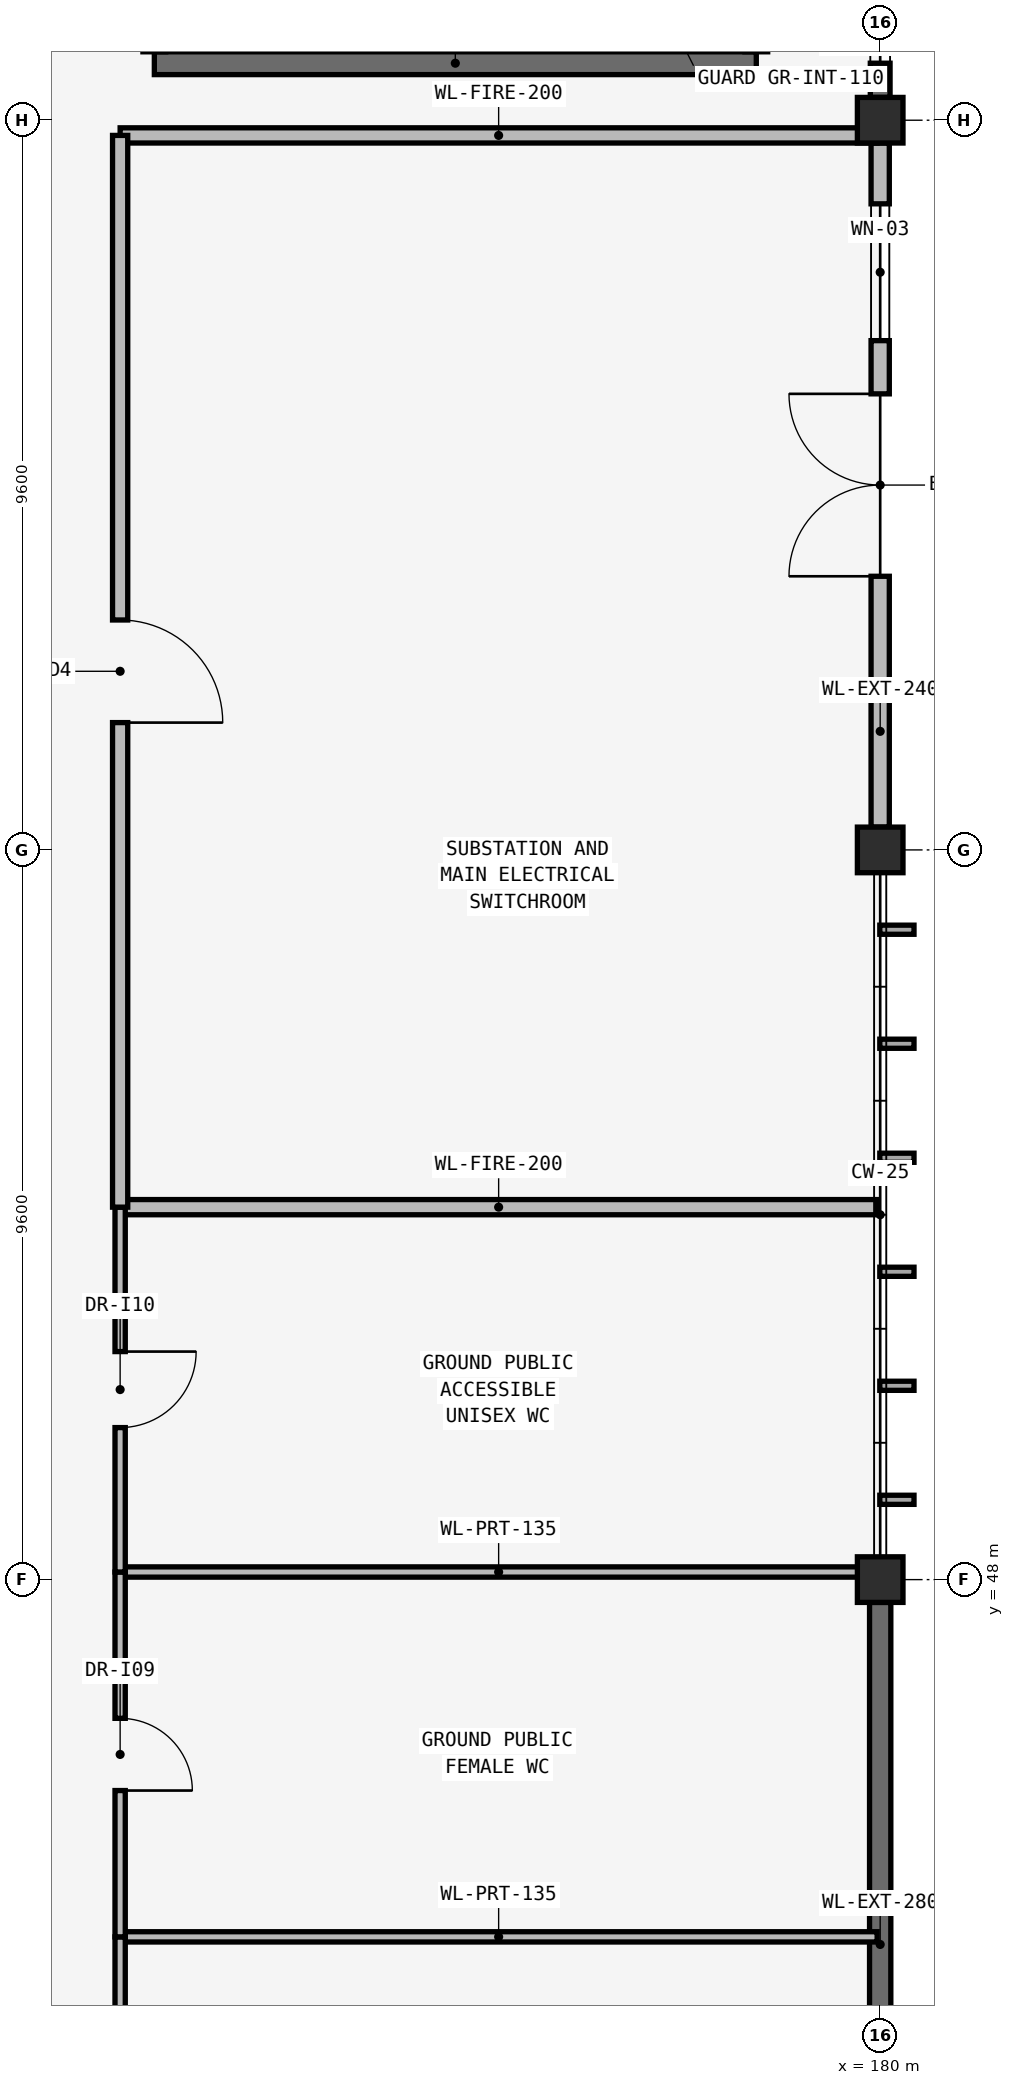
"""IFC4 building model, lengths in metres.
Left out: names, types, materials, properties, quantities, classifications, styles, units other than length and angle.
Written with IfcOpenShell. Run it as: python <this file> out.ifc"""

import sys

from ifc_helpers import new_model, si_unit, direction, frame, frame_2d, origin, origin_2d, place, context, subcontext, project, spatial, rectangle, extrude, element, fill, save


model = new_model("IFC4")
c1 = context("Model", 3, precision=1e-05, world=origin(), true_north=direction((0.0, 1.0)))
c2 = subcontext(c1, "Body", "Model", "MODEL_VIEW")
j1 = project(units=[si_unit("LENGTHUNIT", "METRE"), si_unit("PLANEANGLEUNIT", "RADIAN")], contexts=[c1])
p1 = place(None, origin())
s1 = spatial("IfcSite", under=j1, at=p1, CompositionType="ELEMENT")
p2 = place(p1, origin())
s2 = spatial("IfcBuilding", under=s1, at=p2, CompositionType="ELEMENT")
p3 = place(p2, origin())
s3 = spatial("IfcBuildingStorey", under=s2, at=p3, CompositionType="ELEMENT", Elevation=0.0)
for number, where, z_axis, x_axis in (
    (1, (180.0, 48.0, 0.0), (0.0, 0.0, 1.0), (1.0, 0.0, 0.0)),
    (2, (180.0, 57.6, 0.0), (0.0, 0.0, 1.0), (1.0, 0.0, 0.0)),
    (3, (180.0, 67.2, 0.0), (0.0, 0.0, 1.0), (1.0, 0.0, 0.0)),
):
    element("IfcColumn", number, at=place(p3, frame(where, z_axis=z_axis, x_axis=x_axis)), inside=s3, PredefinedType="COLUMN", context=c2, shape_type="SweptSolid", body=[
        extrude(rectangle(XDim=0.6, YDim=0.6, at=origin_2d()), origin(), (0.0, 0.0, 1.0), 5.4),
    ])
p4 = place(p3, frame((180.0, 38.7, 0.0), z_axis=(0.0, 0.0, 1.0), x_axis=(0.0, 1.0, 0.0)))
e4 = element("IfcWall", 4, at=p4, inside=s3, PredefinedType="SOLIDWALL", context=c2, shape_type="SweptSolid", body=[
    extrude(rectangle(XDim=9.0, YDim=0.28, at=frame_2d((4.5, 0.0))), origin(), (0.0, 0.0, 1.0), 5.1),
])
p5 = place(p3, frame((180.0, 57.9, 0.0), z_axis=(0.0, 0.0, 1.0), x_axis=(0.0, 1.0, 0.0)))
e5 = element("IfcWall", 5, at=p5, inside=s3, PredefinedType="SOLIDWALL", context=c2, shape_type="SweptSolid", body=[
    extrude(rectangle(XDim=9.0, YDim=0.24, at=frame_2d((4.5, 0.0))), origin(), (0.0, 0.0, 1.0), 4.321),
])
p6 = place(p5, frame((3.3, 0.0, 0.0)))
e6 = element("IfcOpeningElement", 6, at=p6, cuts=e5, PredefinedType="OPENING", context=c2, shape_type="SweptSolid", body=[
    extrude(rectangle(XDim=2.4, YDim=2.4, at=frame_2d((1.2, 1.2))), frame((0.0, 0.135, 0.0), z_axis=(0.0, -1.0, 0.0), x_axis=(1.0, 0.0, 0.0)), (0.0, 0.0, 1.0), 0.27),
])
p7 = place(p5, frame((6.4, 0.0, 0.9)))
e7 = element("IfcOpeningElement", 7, at=p7, cuts=e5, PredefinedType="OPENING", context=c2, shape_type="SweptSolid", body=[
    extrude(rectangle(XDim=1.8, YDim=1.8, at=frame_2d((0.9, 0.9))), frame((0.0, 0.135, 0.0), z_axis=(0.0, -1.0, 0.0), x_axis=(1.0, 0.0, 0.0)), (0.0, 0.0, 1.0), 0.27),
])
p8 = place(p3, frame((180.0, 67.5, 0.0), z_axis=(0.0, 0.0, 1.0), x_axis=(0.0, 1.0, 0.0)))
e8 = element("IfcWall", 8, at=p8, inside=s3, PredefinedType="SOLIDWALL", context=c2, shape_type="SweptSolid", body=[
    extrude(rectangle(XDim=9.0, YDim=0.26, at=frame_2d((4.5, 0.0))), origin(), (0.0, 0.0, 1.0), 5.1),
])
p9 = place(p8, frame((3.75, 0.0, 0.0)))
e9 = element("IfcOpeningElement", 9, at=p9, cuts=e8, PredefinedType="OPENING", context=c2, shape_type="SweptSolid", body=[
    extrude(rectangle(XDim=1.5, YDim=2.2, at=frame_2d((0.75, 1.1))), frame((0.0, 0.145, 0.0), z_axis=(0.0, -1.0, 0.0), x_axis=(1.0, 0.0, 0.0)), (0.0, 0.0, 1.0), 0.29),
])
p10 = place(p8, frame((5.4, 0.0, 0.85)))
e10 = element("IfcOpeningElement", 10, at=p10, cuts=e8, PredefinedType="OPENING", context=c2, shape_type="SweptSolid", body=[
    extrude(rectangle(XDim=2.25, YDim=1.95, at=frame_2d((1.125, 0.975))), frame((0.0, 0.145, 0.0), z_axis=(0.0, -1.0, 0.0), x_axis=(1.0, 0.0, 0.0)), (0.0, 0.0, 1.0), 0.29),
])
p11 = place(p8, frame((0.45, 0.0, 0.85)))
e11 = element("IfcOpeningElement", 11, at=p11, cuts=e8, PredefinedType="OPENING", context=c2, shape_type="SweptSolid", body=[
    extrude(rectangle(XDim=2.85, YDim=1.95, at=frame_2d((1.425, 0.975))), frame((0.0, 0.145, 0.0), z_axis=(0.0, -1.0, 0.0), x_axis=(1.0, 0.0, 0.0)), (0.0, 0.0, 1.0), 0.29),
])
p12 = place(p3, frame((170.45, 67.95, 0.0), z_axis=(0.0, 0.0, 1.0), x_axis=(1.0, 0.0, 0.0)))
e12 = element("IfcWall", 12, at=p12, inside=s3, PredefinedType="SHEAR", context=c2, shape_type="SweptSolid", body=[
    extrude(rectangle(XDim=7.92, YDim=0.3, at=frame_2d((3.96, 0.0))), origin(), (0.0, 0.0, 1.0), 5.08),
])
p13 = place(p3, frame((170.0, 43.3, 0.0), z_axis=(0.0, 0.0, 1.0), x_axis=(1.0, 0.0, 0.0)))
e13 = element("IfcWall", 13, at=p13, inside=s3, PredefinedType="PARTITIONING", context=c2, shape_type="SweptSolid", body=[
    extrude(rectangle(XDim=9.96, YDim=0.135, at=frame_2d((4.98, 0.0))), origin(), (0.0, 0.0, 1.0), 5.08),
])
p14 = place(p3, frame((170.0, 48.1, 0.0), z_axis=(0.0, 0.0, 1.0), x_axis=(1.0, 0.0, 0.0)))
e14 = element("IfcWall", 14, at=p14, inside=s3, PredefinedType="PARTITIONING", context=c2, shape_type="SweptSolid", body=[
    extrude(rectangle(XDim=9.96, YDim=0.135, at=frame_2d((4.98, 0.0))), origin(), (0.0, 0.0, 1.0), 4.66),
])
p15 = place(p3, frame((170.0, 52.9, 0.0), z_axis=(0.0, 0.0, 1.0), x_axis=(1.0, 0.0, 0.0)))
e15 = element("IfcWall", 15, at=p15, inside=s3, PredefinedType="SOLIDWALL", context=c2, shape_type="SweptSolid", body=[
    extrude(rectangle(XDim=9.96, YDim=0.2, at=frame_2d((4.98, 0.0))), origin(), (0.0, 0.0, 1.0), 5.08),
])
p16 = place(p3, frame((170.0, 67.0, 0.0), z_axis=(0.0, 0.0, 1.0), x_axis=(1.0, 0.0, 0.0)))
e16 = element("IfcWall", 16, at=p16, inside=s3, PredefinedType="SOLIDWALL", context=c2, shape_type="SweptSolid", body=[
    extrude(rectangle(XDim=9.96, YDim=0.2, at=frame_2d((4.98, 0.0))), origin(), (0.0, 0.0, 1.0), 4.66),
])
p17 = place(p3, frame((170.0, 38.65, 0.0), z_axis=(0.0, 0.0, 1.0), x_axis=(0.0, 1.0, 0.0)))
e17 = element("IfcWall", 17, at=p17, inside=s3, PredefinedType="PARTITIONING", context=c2, shape_type="SweptSolid", body=[
    extrude(rectangle(XDim=4.65, YDim=0.135, at=frame_2d((2.325, 0.0))), origin(), (0.0, 0.0, 1.0), 5.08),
])
p18 = place(p17, frame((1.85, 0.0, 0.0)))
e18 = element("IfcOpeningElement", 18, at=p18, cuts=e17, PredefinedType="OPENING", context=c2, shape_type="SweptSolid", body=[
    extrude(rectangle(XDim=0.95, YDim=2.1, at=frame_2d((0.475, 1.05))), frame((0.0, 0.083, 0.0), z_axis=(0.0, -1.0, 0.0), x_axis=(1.0, 0.0, 0.0)), (0.0, 0.0, 1.0), 0.165),
])
p19 = place(p3, frame((170.0, 43.3, 0.0), z_axis=(0.0, 0.0, 1.0), x_axis=(0.0, 1.0, 0.0)))
e19 = element("IfcWall", 19, at=p19, inside=s3, PredefinedType="PARTITIONING", context=c2, shape_type="SweptSolid", body=[
    extrude(rectangle(XDim=4.8, YDim=0.135, at=frame_2d((2.4, 0.0))), origin(), (0.0, 0.0, 1.0), 5.08),
])
p20 = place(p19, frame((1.925, 0.0, 0.0)))
e20 = element("IfcOpeningElement", 20, at=p20, cuts=e19, PredefinedType="OPENING", context=c2, shape_type="SweptSolid", body=[
    extrude(rectangle(XDim=0.95, YDim=2.1, at=frame_2d((0.475, 1.05))), frame((0.0, 0.083, 0.0), z_axis=(0.0, -1.0, 0.0), x_axis=(1.0, 0.0, 0.0)), (0.0, 0.0, 1.0), 0.165),
])
p21 = place(p3, frame((170.0, 48.1, 0.0), z_axis=(0.0, 0.0, 1.0), x_axis=(0.0, 1.0, 0.0)))
e21 = element("IfcWall", 21, at=p21, inside=s3, PredefinedType="PARTITIONING", context=c2, shape_type="SweptSolid", body=[
    extrude(rectangle(XDim=4.8, YDim=0.135, at=frame_2d((2.4, 0.0))), origin(), (0.0, 0.0, 1.0), 5.08),
])
p22 = place(p21, frame((1.9, 0.0, 0.0)))
e22 = element("IfcOpeningElement", 22, at=p22, cuts=e21, PredefinedType="OPENING", context=c2, shape_type="SweptSolid", body=[
    extrude(rectangle(XDim=1.0, YDim=2.1, at=frame_2d((0.5, 1.05))), frame((0.0, 0.083, 0.0), z_axis=(0.0, -1.0, 0.0), x_axis=(1.0, 0.0, 0.0)), (0.0, 0.0, 1.0), 0.165),
])
p23 = place(p3, frame((170.0, 52.9, 0.0), z_axis=(0.0, 0.0, 1.0), x_axis=(0.0, 1.0, 0.0)))
e23 = element("IfcWall", 23, at=p23, inside=s3, PredefinedType="SOLIDWALL", context=c2, shape_type="SweptSolid", body=[
    extrude(rectangle(XDim=14.1, YDim=0.2, at=frame_2d((7.05, 0.0))), origin(), (0.0, 0.0, 1.0), 5.08),
])
p24 = place(p23, frame((6.375, 0.0, 0.0)))
e24 = element("IfcOpeningElement", 24, at=p24, cuts=e23, PredefinedType="OPENING", context=c2, shape_type="SweptSolid", body=[
    extrude(rectangle(XDim=1.35, YDim=2.2, at=frame_2d((0.675, 1.1))), frame((0.0, 0.115, 0.0), z_axis=(0.0, -1.0, 0.0), x_axis=(1.0, 0.0, 0.0)), (0.0, 0.0, 1.0), 0.23),
])
p25 = place(p6, frame((2.4, 0.0, 0.0), z_axis=(0.0, 0.0, 1.0), x_axis=(-1.0, 0.0, 0.0)))
e25 = element("IfcDoor", 25, at=p25, inside=s3, OperationType="DOUBLE_DOOR_SINGLE_SWING", PredefinedType="DOOR", context=c2, shape_type="SweptSolid", body=[
    extrude(rectangle(XDim=2.4, YDim=2.4, at=frame_2d((1.2, 1.2))), frame((0.0, 0.025, 0.0), z_axis=(0.0, -1.0, 0.0), x_axis=(1.0, 0.0, 0.0)), (0.0, 0.0, 1.0), 0.05),
])
fill(e6, e25)
p26 = place(p7, origin())
e26 = element("IfcWindow", 26, at=p26, inside=s3, PartitioningType="SINGLE_PANEL", PredefinedType="WINDOW", context=c2, shape_type="SweptSolid", body=[
    extrude(rectangle(XDim=1.8, YDim=1.8, at=frame_2d((0.9, 0.9))), frame((0.0, 0.03, 0.0), z_axis=(0.0, -1.0, 0.0), x_axis=(1.0, 0.0, 0.0)), (0.0, 0.0, 1.0), 0.06),
])
fill(e7, e26)
p27 = place(p11, origin())
e27 = element("IfcWindow", 27, at=p27, inside=s3, PartitioningType="SINGLE_PANEL", PredefinedType="WINDOW", context=c2, shape_type="SweptSolid", body=[
    extrude(rectangle(XDim=2.85, YDim=1.95, at=frame_2d((1.425, 0.975))), frame((0.0, 0.03, 0.0), z_axis=(0.0, -1.0, 0.0), x_axis=(1.0, 0.0, 0.0)), (0.0, 0.0, 1.0), 0.06),
])
fill(e11, e27)
p28 = place(p20, origin())
e28 = element("IfcDoor", 28, at=p28, inside=s3, OperationType="SINGLE_SWING_LEFT", PredefinedType="DOOR", context=c2, shape_type="SweptSolid", body=[
    extrude(rectangle(XDim=0.95, YDim=2.1, at=frame_2d((0.475, 1.05))), frame((0.0, 0.025, 0.0), z_axis=(0.0, -1.0, 0.0), x_axis=(1.0, 0.0, 0.0)), (0.0, 0.0, 1.0), 0.05),
])
fill(e20, e28)
p29 = place(p22, origin())
e29 = element("IfcDoor", 29, at=p29, inside=s3, OperationType="SINGLE_SWING_RIGHT", PredefinedType="DOOR", context=c2, shape_type="SweptSolid", body=[
    extrude(rectangle(XDim=1.0, YDim=2.1, at=frame_2d((0.5, 1.05))), frame((0.0, 0.025, 0.0), z_axis=(0.0, -1.0, 0.0), x_axis=(1.0, 0.0, 0.0)), (0.0, 0.0, 1.0), 0.05),
])
fill(e22, e29)
p30 = place(p24, origin())
e30 = element("IfcDoor", 30, at=p30, inside=s3, OperationType="SINGLE_SWING_LEFT", PredefinedType="DOOR", context=c2, shape_type="SweptSolid", body=[
    extrude(rectangle(XDim=1.35, YDim=2.2, at=frame_2d((0.675, 1.1))), frame((0.0, 0.025, 0.0), z_axis=(0.0, -1.0, 0.0), x_axis=(1.0, 0.0, 0.0)), (0.0, 0.0, 1.0), 0.05),
])
fill(e24, e30)
save(model, sys.argv[1])
